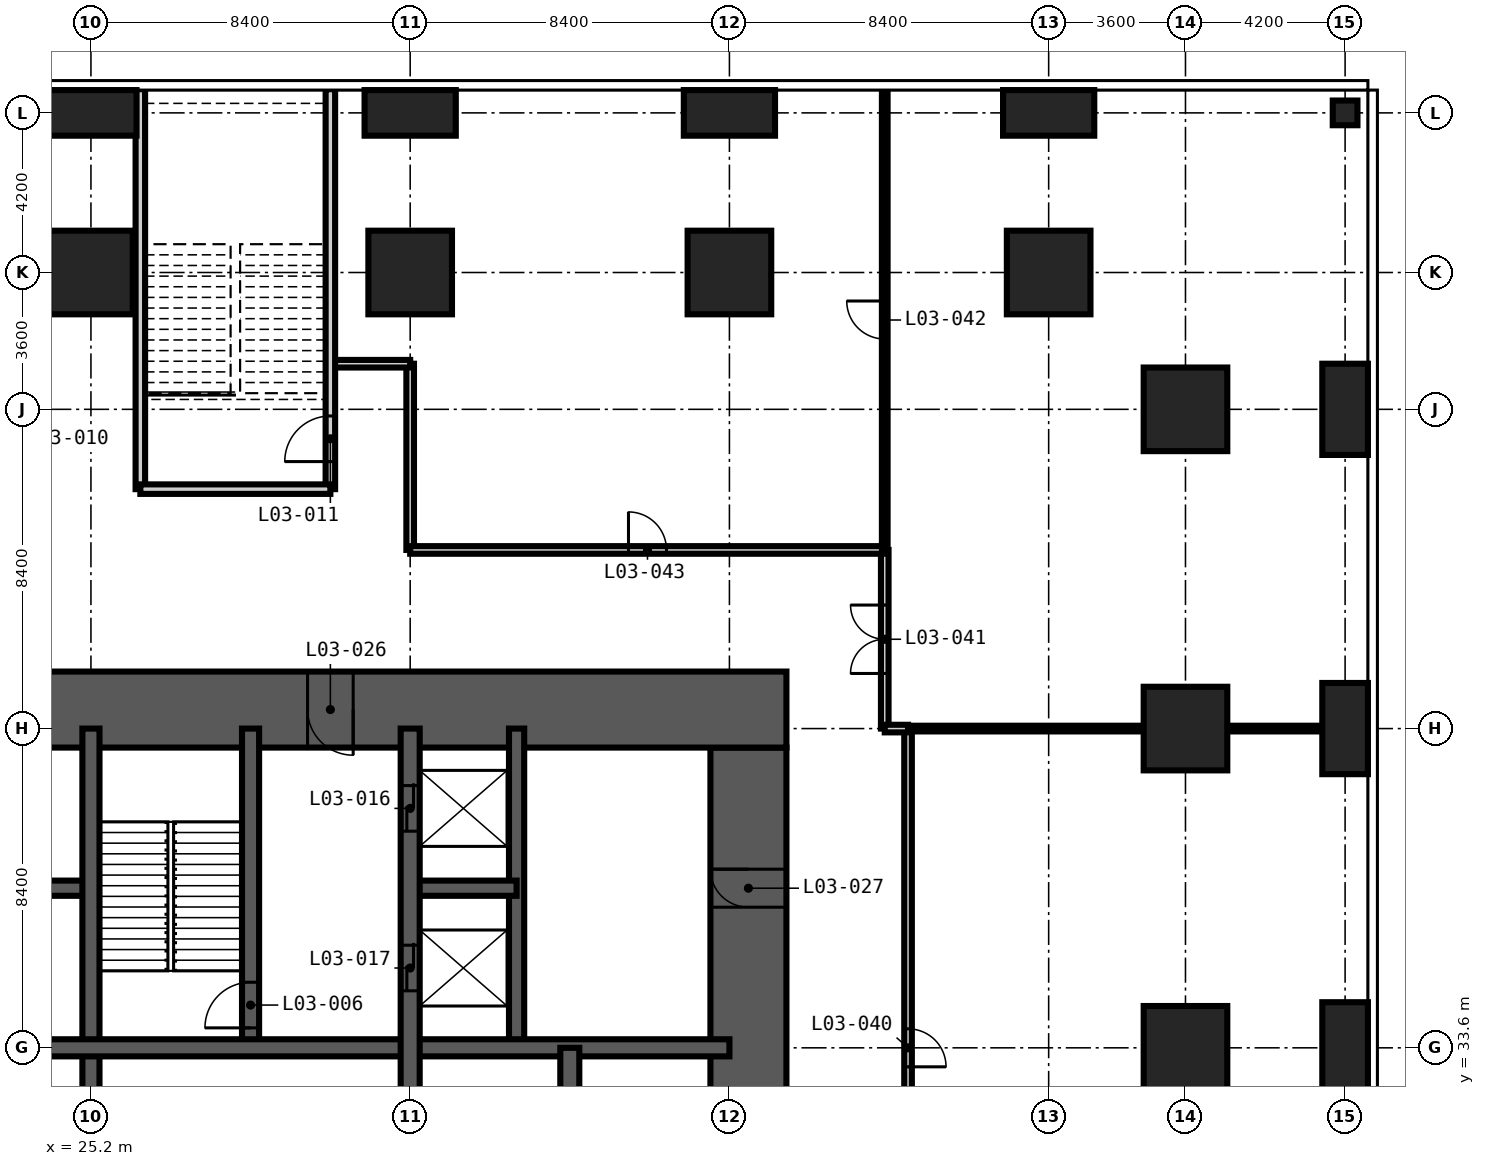
"""IFC4 building model, lengths in metres.
Left out: names, types, materials, properties, quantities, classifications, styles, units other than length and angle.
Written with IfcOpenShell. Run it as: python <this file> out.ifc"""

import sys

from ifc_helpers import new_model, si_unit, direction, frame, frame_2d, origin, origin_2d, place, context, subcontext, project, spatial, rectangle, extrude, element, fill, save


model = new_model("IFC4")
c1 = context("Model", 3, precision=1e-05, world=origin(), true_north=direction((0.0, 1.0)))
c2 = subcontext(c1, "Body", "Model", "MODEL_VIEW")
j1 = project(units=[si_unit("LENGTHUNIT", "METRE"), si_unit("PLANEANGLEUNIT", "RADIAN")], contexts=[c1])
p1 = place(None, origin())
s1 = spatial("IfcSite", under=j1, at=p1, CompositionType="ELEMENT")
p2 = place(p1, origin())
s2 = spatial("IfcBuilding", under=s1, at=p2, CompositionType="ELEMENT")
p3 = place(p2, frame((0.0, 0.0, 17.0)))
s3 = spatial("IfcBuildingStorey", under=s2, at=p3, CompositionType="ELEMENT", Elevation=17.0)
p4 = place(p3, frame((25.2, 54.0, -0.3), z_axis=(0.0, 0.0, 1.0), x_axis=(1.0, 0.0, 0.0)))
e1 = element("IfcColumn", 1, at=p4, inside=s3, PredefinedType="COLUMN", context=c2, shape_type="SweptSolid", body=[
    extrude(rectangle(XDim=2.2, YDim=2.2, at=origin_2d()), origin(), (0.0, 0.0, 1.0), 4.95),
])
p5 = place(p3, frame((25.2, 58.2, -0.3), z_axis=(0.0, 0.0, 1.0), x_axis=(1.0, 0.0, 0.0)))
e2 = element("IfcColumn", 2, at=p5, inside=s3, PredefinedType="COLUMN", context=c2, shape_type="SweptSolid", body=[
    extrude(rectangle(XDim=2.4, YDim=1.2, at=origin_2d()), origin(), (0.0, 0.0, 1.0), 4.95),
])
p6 = place(p3, frame((33.6, 54.0, -0.3), z_axis=(0.0, 0.0, 1.0), x_axis=(1.0, 0.0, 0.0)))
e3 = element("IfcColumn", 3, at=p6, inside=s3, PredefinedType="COLUMN", context=c2, shape_type="SweptSolid", body=[
    extrude(rectangle(XDim=2.2, YDim=2.2, at=origin_2d()), origin(), (0.0, 0.0, 1.0), 4.95),
])
p7 = place(p3, frame((33.6, 58.2, -0.3), z_axis=(0.0, 0.0, 1.0), x_axis=(1.0, 0.0, 0.0)))
e4 = element("IfcColumn", 4, at=p7, inside=s3, PredefinedType="COLUMN", context=c2, shape_type="SweptSolid", body=[
    extrude(rectangle(XDim=2.4, YDim=1.2, at=origin_2d()), origin(), (0.0, 0.0, 1.0), 4.95),
])
p8 = place(p3, frame((42.0, 54.0, -0.3), z_axis=(0.0, 0.0, 1.0), x_axis=(1.0, 0.0, 0.0)))
e5 = element("IfcColumn", 5, at=p8, inside=s3, PredefinedType="COLUMN", context=c2, shape_type="SweptSolid", body=[
    extrude(rectangle(XDim=2.2, YDim=2.2, at=origin_2d()), origin(), (0.0, 0.0, 1.0), 4.95),
])
p9 = place(p3, frame((42.0, 58.2, -0.3), z_axis=(0.0, 0.0, 1.0), x_axis=(1.0, 0.0, 0.0)))
e6 = element("IfcColumn", 6, at=p9, inside=s3, PredefinedType="COLUMN", context=c2, shape_type="SweptSolid", body=[
    extrude(rectangle(XDim=2.4, YDim=1.2, at=origin_2d()), origin(), (0.0, 0.0, 1.0), 4.95),
])
p10 = place(p3, frame((50.4, 54.0, -0.3), z_axis=(0.0, 0.0, 1.0), x_axis=(1.0, 0.0, 0.0)))
e7 = element("IfcColumn", 7, at=p10, inside=s3, PredefinedType="COLUMN", context=c2, shape_type="SweptSolid", body=[
    extrude(rectangle(XDim=2.2, YDim=2.2, at=origin_2d()), origin(), (0.0, 0.0, 1.0), 4.95),
])
p11 = place(p3, frame((50.4, 58.2, -0.3), z_axis=(0.0, 0.0, 1.0), x_axis=(1.0, 0.0, 0.0)))
e8 = element("IfcColumn", 8, at=p11, inside=s3, PredefinedType="COLUMN", context=c2, shape_type="SweptSolid", body=[
    extrude(rectangle(XDim=2.4, YDim=1.2, at=origin_2d()), origin(), (0.0, 0.0, 1.0), 4.95),
])
for number, where, z_axis, x_axis in (
    (9, (54.0, 33.6, -0.3), (0.0, 0.0, 1.0), (1.0, 0.0, 0.0)),
    (10, (54.0, 42.0, -0.3), (0.0, 0.0, 1.0), (1.0, 0.0, 0.0)),
    (11, (54.0, 50.4, -0.3), (0.0, 0.0, 1.0), (1.0, 0.0, 0.0)),
):
    element("IfcColumn", number, at=place(p3, frame(where, z_axis=z_axis, x_axis=x_axis)), inside=s3, PredefinedType="COLUMN", context=c2, shape_type="SweptSolid", body=[
        extrude(rectangle(XDim=2.2, YDim=2.2, at=origin_2d()), origin(), (0.0, 0.0, 1.0), 4.95),
    ])
for number, where, z_axis, x_axis in (
    (12, (58.2, 33.6, -0.3), (0.0, 0.0, 1.0), (1.0, 0.0, 0.0)),
    (13, (58.2, 42.0, -0.3), (0.0, 0.0, 1.0), (1.0, 0.0, 0.0)),
    (14, (58.2, 50.4, -0.3), (0.0, 0.0, 1.0), (1.0, 0.0, 0.0)),
):
    element("IfcColumn", number, at=place(p3, frame(where, z_axis=z_axis, x_axis=x_axis)), inside=s3, PredefinedType="COLUMN", context=c2, shape_type="SweptSolid", body=[
        extrude(rectangle(XDim=1.2, YDim=2.4, at=origin_2d()), origin(), (0.0, 0.0, 1.0), 4.95),
    ])
p12 = place(p3, frame((58.2, 58.2, -0.3), z_axis=(0.0, 0.0, 1.0), x_axis=(1.0, 0.0, 0.0)))
e15 = element("IfcColumn", 15, at=p12, inside=s3, PredefinedType="COLUMN", context=c2, shape_type="SweptSolid", body=[
    extrude(rectangle(XDim=0.65, YDim=0.65, at=origin_2d()), origin(), (0.0, 0.0, 1.0), 4.95),
])
p13 = place(p3, frame((42.5, 17.3, -0.3), z_axis=(0.0, 0.0, 1.0), x_axis=(0.0, 1.0, 0.0)))
e16 = element("IfcWall", 16, at=p13, inside=s3, PredefinedType="SHEAR", context=c2, shape_type="SweptSolid", body=[
    extrude(rectangle(XDim=24.2, YDim=2.0, at=frame_2d((12.1, 0.0))), origin(), (0.0, 0.0, 1.0), 4.95),
])
p14 = place(p13, frame((0.3, 0.0, 0.3)))
e17 = element("IfcOpeningElement", 17, at=p14, cuts=e16, PredefinedType="OPENING", context=c2, shape_type="SweptSolid", body=[
    extrude(rectangle(XDim=1.2, YDim=2.2, at=frame_2d((0.6, 1.1))), frame((0.0, 1.01, 0.0), z_axis=(0.0, -1.0, 0.0), x_axis=(1.0, 0.0, 0.0)), (0.0, 0.0, 1.0), 2.02),
])
p15 = place(p13, frame((11.6, 0.0, 0.3)))
e18 = element("IfcOpeningElement", 18, at=p15, cuts=e16, PredefinedType="OPENING", context=c2, shape_type="SweptSolid", body=[
    extrude(rectangle(XDim=1.0, YDim=2.1, at=frame_2d((0.5, 1.05))), frame((0.0, 1.01, 0.0), z_axis=(0.0, -1.0, 0.0), x_axis=(1.0, 0.0, 0.0)), (0.0, 0.0, 1.0), 2.02),
])
p16 = place(p13, frame((20.0, 0.0, 0.3)))
e19 = element("IfcOpeningElement", 19, at=p16, cuts=e16, PredefinedType="OPENING", context=c2, shape_type="SweptSolid", body=[
    extrude(rectangle(XDim=1.0, YDim=2.1, at=frame_2d((0.5, 1.05))), frame((0.0, 1.01, 0.0), z_axis=(0.0, -1.0, 0.0), x_axis=(1.0, 0.0, 0.0)), (0.0, 0.0, 1.0), 2.02),
])
p17 = place(p3, frame((43.5, 42.5, -0.3), z_axis=(0.0, 0.0, 1.0), x_axis=(-1.0, 0.0, 0.0)))
e20 = element("IfcWall", 20, at=p17, inside=s3, PredefinedType="SHEAR", context=c2, shape_type="SweptSolid", body=[
    extrude(rectangle(XDim=28.2, YDim=2.0, at=frame_2d((14.1, 0.0))), origin(), (0.0, 0.0, 1.0), 4.95),
])
p18 = place(p17, frame((22.0, 0.0, 0.3)))
e21 = element("IfcOpeningElement", 21, at=p18, cuts=e20, PredefinedType="OPENING", context=c2, shape_type="SweptSolid", body=[
    extrude(rectangle(XDim=1.0, YDim=2.1, at=frame_2d((0.5, 1.05))), frame((0.0, 1.01, 0.0), z_axis=(0.0, -1.0, 0.0), x_axis=(1.0, 0.0, 0.0)), (0.0, 0.0, 1.0), 2.02),
])
p19 = place(p17, frame((11.4, 0.0, 0.3)))
e22 = element("IfcOpeningElement", 22, at=p19, cuts=e20, PredefinedType="OPENING", context=c2, shape_type="SweptSolid", body=[
    extrude(rectangle(XDim=1.2, YDim=2.2, at=frame_2d((0.6, 1.1))), frame((0.0, 1.01, 0.0), z_axis=(0.0, -1.0, 0.0), x_axis=(1.0, 0.0, 0.0)), (0.0, 0.0, 1.0), 2.02),
])
for number, where, z_axis, x_axis in (
    (23, (36.4, 33.6, -0.3), (0.0, 0.0, 1.0), (0.0, 1.0, 0.0)),
    (24, (16.8, 37.8, -0.3), (0.0, 0.0, 1.0), (1.0, 0.0, 0.0)),
):
    element("IfcWall", number, at=place(p3, frame(where, z_axis=z_axis, x_axis=x_axis)), inside=s3, PredefinedType="SHEAR", context=c2, shape_type="SweptSolid", body=[
        extrude(rectangle(XDim=8.4, YDim=0.4, at=frame_2d((4.2, 0.0))), origin(), (0.0, 0.0, 1.0), 4.95),
    ])
p20 = place(p3, frame((33.6, 37.8, -0.3), z_axis=(0.0, 0.0, 1.0), x_axis=(1.0, 0.0, 0.0)))
e25 = element("IfcWall", 25, at=p20, inside=s3, PredefinedType="SHEAR", context=c2, shape_type="SweptSolid", body=[
    extrude(rectangle(XDim=2.8, YDim=0.4, at=frame_2d((1.4, 0.0))), origin(), (0.0, 0.0, 1.0), 4.95),
])
p21 = place(p3, frame((25.2, 16.8, -0.3), z_axis=(0.0, 0.0, 1.0), x_axis=(0.0, 1.0, 0.0)))
e26 = element("IfcWall", 26, at=p21, inside=s3, PredefinedType="SHEAR", context=c2, shape_type="SweptSolid", body=[
    extrude(rectangle(XDim=25.2, YDim=0.45, at=frame_2d((12.6, 0.0))), origin(), (0.0, 0.0, 1.0), 4.95),
])
p22 = place(p3, frame((29.4, 33.6, -0.3), z_axis=(0.0, 0.0, 1.0), x_axis=(0.0, 1.0, 0.0)))
e27 = element("IfcWall", 27, at=p22, inside=s3, PredefinedType="SHEAR", context=c2, shape_type="SweptSolid", body=[
    extrude(rectangle(XDim=8.4, YDim=0.45, at=frame_2d((4.2, 0.0))), origin(), (0.0, 0.0, 1.0), 4.95),
])
p23 = place(p22, frame((0.525, 0.0, 0.3)))
e28 = element("IfcOpeningElement", 28, at=p23, cuts=e27, PredefinedType="OPENING", context=c2, shape_type="SweptSolid", body=[
    extrude(rectangle(XDim=1.2, YDim=2.2, at=frame_2d((0.6, 1.1))), frame((0.0, 0.235, 0.0), z_axis=(0.0, -1.0, 0.0), x_axis=(1.0, 0.0, 0.0)), (0.0, 0.0, 1.0), 0.47),
])
p24 = place(p3, frame((16.8, 33.6, -0.3), z_axis=(0.0, 0.0, 1.0), x_axis=(1.0, 0.0, 0.0)))
e29 = element("IfcWall", 29, at=p24, inside=s3, PredefinedType="SHEAR", context=c2, shape_type="SweptSolid", body=[
    extrude(rectangle(XDim=25.2, YDim=0.45, at=frame_2d((12.6, 0.0))), origin(), (0.0, 0.0, 1.0), 4.95),
])
p25 = place(p3, frame((33.6, 16.8, -0.3), z_axis=(0.0, 0.0, 1.0), x_axis=(0.0, 1.0, 0.0)))
e30 = element("IfcWall", 30, at=p25, inside=s3, PredefinedType="SHEAR", context=c2, shape_type="SweptSolid", body=[
    extrude(rectangle(XDim=25.2, YDim=0.5, at=frame_2d((12.6, 0.0))), origin(), (0.0, 0.0, 1.0), 4.95),
])
p26 = place(p25, frame((22.5, 0.0, 0.3)))
e31 = element("IfcOpeningElement", 31, at=p26, cuts=e30, PredefinedType="OPENING", context=c2, shape_type="SweptSolid", body=[
    extrude(rectangle(XDim=1.2, YDim=2.2, at=frame_2d((0.6, 1.1))), frame((0.0, 0.26, 0.0), z_axis=(0.0, -1.0, 0.0), x_axis=(1.0, 0.0, 0.0)), (0.0, 0.0, 1.0), 0.52),
])
p27 = place(p25, frame((18.3, 0.0, 0.3)))
e32 = element("IfcOpeningElement", 32, at=p27, cuts=e30, PredefinedType="OPENING", context=c2, shape_type="SweptSolid", body=[
    extrude(rectangle(XDim=1.2, YDim=2.2, at=frame_2d((0.6, 1.1))), frame((0.0, 0.26, 0.0), z_axis=(0.0, -1.0, 0.0), x_axis=(1.0, 0.0, 0.0)), (0.0, 0.0, 1.0), 0.52),
])
p28 = place(p25, frame((12.1, 0.0, 0.3)))
e33 = element("IfcOpeningElement", 33, at=p28, cuts=e30, PredefinedType="OPENING", context=c2, shape_type="SweptSolid", body=[
    extrude(rectangle(XDim=1.0, YDim=2.1, at=frame_2d((0.5, 1.05))), frame((0.0, 0.26, 0.0), z_axis=(0.0, -1.0, 0.0), x_axis=(1.0, 0.0, 0.0)), (0.0, 0.0, 1.0), 0.52),
])
p29 = place(p3, frame((37.8, 30.8, -0.3), z_axis=(0.0, 0.0, 1.0), x_axis=(0.0, 1.0, 0.0)))
e34 = element("IfcWall", 34, at=p29, inside=s3, PredefinedType="SHEAR", context=c2, shape_type="SweptSolid", body=[
    extrude(rectangle(XDim=2.8, YDim=0.5, at=frame_2d((1.4, 0.0))), origin(), (0.0, 0.0, 1.0), 4.95),
])
p30 = place(p3, frame((33.6, 46.7, 0.0), z_axis=(0.0, 0.0, 1.0), x_axis=(0.0, 1.0, 0.0)))
e35 = element("IfcWall", 35, at=p30, inside=s3, PredefinedType="PARTITIONING", context=c2, shape_type="SweptSolid", body=[
    extrude(rectangle(XDim=4.9, YDim=0.2, at=frame_2d((2.45, 0.0))), origin(), (0.0, 0.0, 1.0), 4.65),
])
p31 = place(p3, frame((46.087, 42.0, 0.0), z_axis=(0.0, 0.0, 1.0), x_axis=(0.0, 1.0, 0.0)))
e36 = element("IfcWall", 36, at=p31, inside=s3, PredefinedType="PARTITIONING", context=c2, shape_type="SweptSolid", body=[
    extrude(rectangle(XDim=4.7, YDim=0.2, at=frame_2d((2.35, 0.0))), origin(), (0.0, 0.0, 1.0), 4.65),
])
p32 = place(p31, frame((1.45, 0.0, 0.0)))
e37 = element("IfcOpeningElement", 37, at=p32, cuts=e36, PredefinedType="OPENING", context=c2, shape_type="SweptSolid", body=[
    extrude(rectangle(XDim=1.8, YDim=2.4, at=frame_2d((0.9, 1.2))), frame((0.0, 0.11, 0.0), z_axis=(0.0, -1.0, 0.0), x_axis=(1.0, 0.0, 0.0)), (0.0, 0.0, 1.0), 0.22),
])
p33 = place(p3, frame((46.7, 15.8, 0.0), z_axis=(0.0, 0.0, 1.0), x_axis=(0.0, 1.0, 0.0)))
e38 = element("IfcWall", 38, at=p33, inside=s3, PredefinedType="PARTITIONING", context=c2, shape_type="SweptSolid", body=[
    extrude(rectangle(XDim=26.2, YDim=0.2, at=frame_2d((13.1, 0.0))), origin(), (0.0, 0.0, 1.0), 4.65),
])
p34 = place(p33, frame((3.8, 0.0, 0.0)))
e39 = element("IfcOpeningElement", 39, at=p34, cuts=e38, PredefinedType="OPENING", context=c2, shape_type="SweptSolid", body=[
    extrude(rectangle(XDim=1.8, YDim=2.4, at=frame_2d((0.9, 1.2))), frame((0.0, 0.11, 0.0), z_axis=(0.0, -1.0, 0.0), x_axis=(1.0, 0.0, 0.0)), (0.0, 0.0, 1.0), 0.22),
])
p35 = place(p33, frame((17.3, 0.0, 0.0)))
e40 = element("IfcOpeningElement", 40, at=p35, cuts=e38, PredefinedType="OPENING", context=c2, shape_type="SweptSolid", body=[
    extrude(rectangle(XDim=1.0, YDim=2.1, at=frame_2d((0.5, 1.05))), frame((0.0, 0.11, 0.0), z_axis=(0.0, -1.0, 0.0), x_axis=(1.0, 0.0, 0.0)), (0.0, 0.0, 1.0), 0.22),
])
p36 = place(p3, frame((33.6, 46.7, 0.0), z_axis=(0.0, 0.0, 1.0), x_axis=(1.0, 0.0, 0.0)))
e41 = element("IfcWall", 41, at=p36, inside=s3, PredefinedType="PARTITIONING", context=c2, shape_type="SweptSolid", body=[
    extrude(rectangle(XDim=12.487, YDim=0.2, at=frame_2d((6.243, 0.0))), origin(), (0.0, 0.0, 1.0), 4.65),
])
p37 = place(p36, frame((5.744, 0.0, 0.0)))
e42 = element("IfcOpeningElement", 42, at=p37, cuts=e41, PredefinedType="OPENING", context=c2, shape_type="SweptSolid", body=[
    extrude(rectangle(XDim=1.0, YDim=2.1, at=frame_2d((0.5, 1.05))), frame((0.0, 0.11, 0.0), z_axis=(0.0, -1.0, 0.0), x_axis=(1.0, 0.0, 0.0)), (0.0, 0.0, 1.0), 0.22),
])
p38 = place(p3, frame((31.5, 51.6, 0.0), z_axis=(0.0, 0.0, 1.0), x_axis=(1.0, 0.0, 0.0)))
e43 = element("IfcWall", 43, at=p38, inside=s3, PredefinedType="PARTITIONING", context=c2, shape_type="SweptSolid", body=[
    extrude(rectangle(XDim=2.1, YDim=0.2, at=frame_2d((1.05, 0.0))), origin(), (0.0, 0.0, 1.0), 4.65),
])
p39 = place(p3, frame((46.7, 42.0, 0.0), z_axis=(0.0, 0.0, 1.0), x_axis=(-1.0, 0.0, 0.0)))
e44 = element("IfcWall", 44, at=p39, inside=s3, PredefinedType="PARTITIONING", context=c2, shape_type="SweptSolid", body=[
    extrude(rectangle(XDim=0.613, YDim=0.2, at=frame_2d((0.307, 0.0))), origin(), (0.0, 0.0, 1.0), 4.65),
])
p40 = place(p3, frame((46.087, 46.7, 0.0), z_axis=(0.0, 0.0, 1.0), x_axis=(0.0, 1.0, 0.0)))
e45 = element("IfcWall", 45, at=p40, inside=s3, PredefinedType="PARTITIONING", context=c2, shape_type="SweptSolid", body=[
    extrude(rectangle(XDim=12.1, YDim=0.15, at=frame_2d((6.05, 0.0))), origin(), (0.0, 0.0, 1.0), 4.65),
])
p41 = place(p40, frame((5.55, 0.0, 0.0)))
e46 = element("IfcOpeningElement", 46, at=p41, cuts=e45, PredefinedType="OPENING", context=c2, shape_type="SweptSolid", body=[
    extrude(rectangle(XDim=1.0, YDim=2.1, at=frame_2d((0.5, 1.05))), frame((0.0, 0.085, 0.0), z_axis=(0.0, -1.0, 0.0), x_axis=(1.0, 0.0, 0.0)), (0.0, 0.0, 1.0), 0.17),
])
p42 = place(p3, frame((46.7, 42.0, 0.0), z_axis=(0.0, 0.0, 1.0), x_axis=(1.0, 0.0, 0.0)))
e47 = element("IfcWall", 47, at=p42, inside=s3, PredefinedType="PARTITIONING", context=c2, shape_type="SweptSolid", body=[
    extrude(rectangle(XDim=12.1, YDim=0.15, at=frame_2d((6.05, 0.0))), origin(), (0.0, 0.0, 1.0), 4.65),
])
p43 = place(p3, frame((26.5, 48.3, 0.0), z_axis=(0.0, 0.0, 1.0), x_axis=(0.0, 1.0, 0.0)))
e48 = element("IfcWall", 48, at=p43, inside=s3, PredefinedType="PARTITIONING", context=c2, shape_type="SweptSolid", body=[
    extrude(rectangle(XDim=10.523, YDim=0.25, at=frame_2d((5.261, 0.0))), origin(), (0.0, 0.0, 1.0), 4.65),
])
p44 = place(p3, frame((31.5, 48.3, 0.0), z_axis=(0.0, 0.0, 1.0), x_axis=(0.0, 1.0, 0.0)))
e49 = element("IfcWall", 49, at=p44, inside=s3, PredefinedType="PARTITIONING", context=c2, shape_type="SweptSolid", body=[
    extrude(rectangle(XDim=10.523, YDim=0.25, at=frame_2d((5.261, 0.0))), origin(), (0.0, 0.0, 1.0), 4.65),
])
p45 = place(p44, frame((0.725, 0.0, 0.0)))
e50 = element("IfcOpeningElement", 50, at=p45, cuts=e49, PredefinedType="OPENING", context=c2, shape_type="SweptSolid", body=[
    extrude(rectangle(XDim=1.2, YDim=2.2, at=frame_2d((0.6, 1.1))), frame((0.0, 0.135, 0.0), z_axis=(0.0, -1.0, 0.0), x_axis=(1.0, 0.0, 0.0)), (0.0, 0.0, 1.0), 0.27),
])
p46 = place(p3, frame((26.5, 48.3, 0.0), z_axis=(0.0, 0.0, 1.0), x_axis=(1.0, 0.0, 0.0)))
e51 = element("IfcWall", 51, at=p46, inside=s3, PredefinedType="PARTITIONING", context=c2, shape_type="SweptSolid", body=[
    extrude(rectangle(XDim=5.0, YDim=0.25, at=frame_2d((2.5, 0.0))), origin(), (0.0, 0.0, 1.0), 4.65),
])
p47 = place(p23, origin())
e52 = element("IfcDoor", 52, at=p47, inside=s3, OperationType="SINGLE_SWING_LEFT", PredefinedType="DOOR", context=c2, shape_type="SweptSolid", body=[
    extrude(rectangle(XDim=1.2, YDim=2.2, at=frame_2d((0.6, 1.1))), frame((0.0, 0.025, 0.0), z_axis=(0.0, -1.0, 0.0), x_axis=(1.0, 0.0, 0.0)), (0.0, 0.0, 1.0), 0.05),
])
fill(e28, e52)
p48 = place(p45, origin())
e53 = element("IfcDoor", 53, at=p48, inside=s3, OperationType="SINGLE_SWING_LEFT", PredefinedType="DOOR", context=c2, shape_type="SweptSolid", body=[
    extrude(rectangle(XDim=1.2, YDim=2.2, at=frame_2d((0.6, 1.1))), frame((0.0, 0.025, 0.0), z_axis=(0.0, -1.0, 0.0), x_axis=(1.0, 0.0, 0.0)), (0.0, 0.0, 1.0), 0.05),
])
fill(e50, e53)
p49 = place(p26, origin())
e54 = element("IfcDoor", 54, at=p49, inside=s3, OperationType="DOUBLE_DOOR_SLIDING", PredefinedType="DOOR", context=c2, shape_type="SweptSolid", body=[
    extrude(rectangle(XDim=1.2, YDim=2.2, at=frame_2d((0.6, 1.1))), frame((0.0, 0.025, 0.0), z_axis=(0.0, -1.0, 0.0), x_axis=(1.0, 0.0, 0.0)), (0.0, 0.0, 1.0), 0.05),
])
fill(e31, e54)
p50 = place(p27, origin())
e55 = element("IfcDoor", 55, at=p50, inside=s3, OperationType="DOUBLE_DOOR_SLIDING", PredefinedType="DOOR", context=c2, shape_type="SweptSolid", body=[
    extrude(rectangle(XDim=1.2, YDim=2.2, at=frame_2d((0.6, 1.1))), frame((0.0, 0.025, 0.0), z_axis=(0.0, -1.0, 0.0), x_axis=(1.0, 0.0, 0.0)), (0.0, 0.0, 1.0), 0.05),
])
fill(e32, e55)
p51 = place(p19, origin())
e56 = element("IfcDoor", 56, at=p51, inside=s3, OperationType="SINGLE_SWING_LEFT", PredefinedType="DOOR", context=c2, shape_type="SweptSolid", body=[
    extrude(rectangle(XDim=1.2, YDim=2.2, at=frame_2d((0.6, 1.1))), frame((0.0, 0.025, 0.0), z_axis=(0.0, -1.0, 0.0), x_axis=(1.0, 0.0, 0.0)), (0.0, 0.0, 1.0), 0.05),
])
fill(e22, e56)
p52 = place(p16, origin())
e57 = element("IfcDoor", 57, at=p52, inside=s3, OperationType="SINGLE_SWING_RIGHT", PredefinedType="DOOR", context=c2, shape_type="SweptSolid", body=[
    extrude(rectangle(XDim=1.0, YDim=2.1, at=frame_2d((0.5, 1.05))), frame((0.0, 0.025, 0.0), z_axis=(0.0, -1.0, 0.0), x_axis=(1.0, 0.0, 0.0)), (0.0, 0.0, 1.0), 0.05),
])
fill(e19, e57)
p53 = place(p35, frame((1.0, 0.0, 0.0), z_axis=(0.0, 0.0, 1.0), x_axis=(-1.0, 0.0, 0.0)))
e58 = element("IfcDoor", 58, at=p53, inside=s3, OperationType="SINGLE_SWING_RIGHT", PredefinedType="DOOR", context=c2, shape_type="SweptSolid", body=[
    extrude(rectangle(XDim=1.0, YDim=2.1, at=frame_2d((0.5, 1.05))), frame((0.0, 0.025, 0.0), z_axis=(0.0, -1.0, 0.0), x_axis=(1.0, 0.0, 0.0)), (0.0, 0.0, 1.0), 0.05),
])
fill(e40, e58)
p54 = place(p32, origin())
e59 = element("IfcDoor", 59, at=p54, inside=s3, OperationType="DOUBLE_DOOR_DOUBLE_SWING", PredefinedType="DOOR", context=c2, shape_type="SweptSolid", body=[
    extrude(rectangle(XDim=1.8, YDim=2.4, at=frame_2d((0.9, 1.2))), frame((0.0, 0.025, 0.0), z_axis=(0.0, -1.0, 0.0), x_axis=(1.0, 0.0, 0.0)), (0.0, 0.0, 1.0), 0.05),
])
fill(e37, e59)
p55 = place(p41, origin())
e60 = element("IfcDoor", 60, at=p55, inside=s3, OperationType="SINGLE_SWING_RIGHT", PredefinedType="DOOR", context=c2, shape_type="SweptSolid", body=[
    extrude(rectangle(XDim=1.0, YDim=2.1, at=frame_2d((0.5, 1.05))), frame((0.0, 0.025, 0.0), z_axis=(0.0, -1.0, 0.0), x_axis=(1.0, 0.0, 0.0)), (0.0, 0.0, 1.0), 0.05),
])
fill(e46, e60)
p56 = place(p37, origin())
e61 = element("IfcDoor", 61, at=p56, inside=s3, OperationType="SINGLE_SWING_LEFT", PredefinedType="DOOR", context=c2, shape_type="SweptSolid", body=[
    extrude(rectangle(XDim=1.0, YDim=2.1, at=frame_2d((0.5, 1.05))), frame((0.0, 0.025, 0.0), z_axis=(0.0, -1.0, 0.0), x_axis=(1.0, 0.0, 0.0)), (0.0, 0.0, 1.0), 0.05),
])
fill(e42, e61)
save(model, sys.argv[1])
